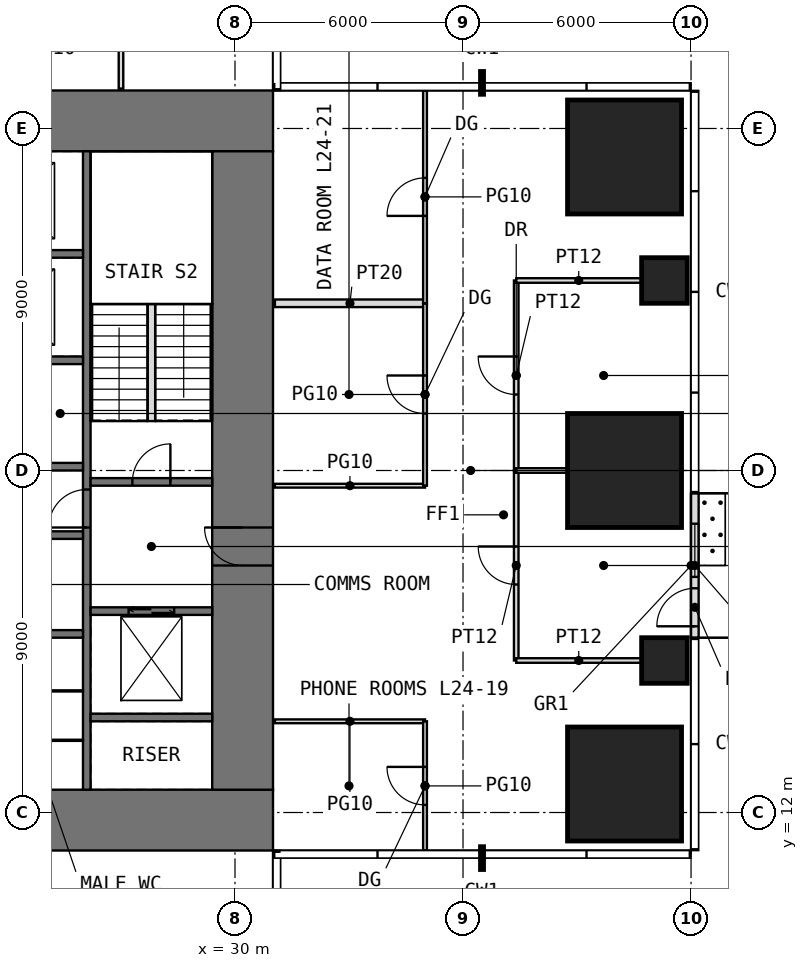
"""IFC4 building model, lengths in metres.
Left out: names, types, materials, properties, quantities, classifications, styles, units other than length and angle.
Written with IfcOpenShell. Run it as: python <this file> out.ifc"""

import sys

from ifc_helpers import new_model, si_unit, direction, frame, frame_2d, origin, origin_2d, place, context, subcontext, project, spatial, rectangle, extrude, element, fill, save


model = new_model("IFC4")
c1 = context("Model", 3, precision=1e-05, world=origin(), true_north=direction((0.0, 1.0)))
c2 = subcontext(c1, "Body", "Model", "MODEL_VIEW")
j1 = project(units=[si_unit("LENGTHUNIT", "METRE"), si_unit("PLANEANGLEUNIT", "RADIAN")], contexts=[c1])
p1 = place(None, origin())
s1 = spatial("IfcSite", under=j1, at=p1, CompositionType="ELEMENT")
p2 = place(p1, origin())
s2 = spatial("IfcBuilding", under=s1, at=p2, CompositionType="ELEMENT")
p3 = place(p2, frame((0.0, 0.0, 104.5)))
s3 = spatial("IfcBuildingStorey", under=s2, at=p3, CompositionType="ELEMENT", Elevation=104.5)
p4 = place(p3, frame((40.25, 12.75, 0.0), z_axis=(0.0, 0.0, 1.0), x_axis=(1.0, 0.0, 0.0)))
e1 = element("IfcColumn", 1, at=p4, inside=s3, PredefinedType="COLUMN", context=c2, shape_type="SweptSolid", body=[
    extrude(rectangle(XDim=3.0, YDim=3.0, at=origin_2d()), origin(), (0.0, 0.0, 1.0), 4.0),
])
p5 = place(p3, frame((41.3, 16.0, 0.0), z_axis=(0.0, 0.0, 1.0), x_axis=(1.0, 0.0, 0.0)))
e2 = element("IfcColumn", 2, at=p5, inside=s3, PredefinedType="COLUMN", context=c2, shape_type="SweptSolid", body=[
    extrude(rectangle(XDim=1.2, YDim=1.2, at=origin_2d()), origin(), (0.0, 0.0, 1.0), 4.0),
])
p6 = place(p3, frame((40.25, 21.0, 0.0), z_axis=(0.0, 0.0, 1.0), x_axis=(1.0, 0.0, 0.0)))
e3 = element("IfcColumn", 3, at=p6, inside=s3, PredefinedType="COLUMN", context=c2, shape_type="SweptSolid", body=[
    extrude(rectangle(XDim=3.0, YDim=3.0, at=origin_2d()), origin(), (0.0, 0.0, 1.0), 4.0),
])
p7 = place(p3, frame((41.3, 26.0, 0.0), z_axis=(0.0, 0.0, 1.0), x_axis=(1.0, 0.0, 0.0)))
e4 = element("IfcColumn", 4, at=p7, inside=s3, PredefinedType="COLUMN", context=c2, shape_type="SweptSolid", body=[
    extrude(rectangle(XDim=1.2, YDim=1.2, at=origin_2d()), origin(), (0.0, 0.0, 1.0), 4.0),
])
p8 = place(p3, frame((40.25, 29.25, 0.0), z_axis=(0.0, 0.0, 1.0), x_axis=(1.0, 0.0, 0.0)))
e5 = element("IfcColumn", 5, at=p8, inside=s3, PredefinedType="COLUMN", context=c2, shape_type="SweptSolid", body=[
    extrude(rectangle(XDim=3.0, YDim=3.0, at=origin_2d()), origin(), (0.0, 0.0, 1.0), 4.0),
])
p9 = place(p3, frame((42.1, 16.6, 0.0), z_axis=(0.0, 0.0, 1.0), x_axis=(0.0, 1.0, 0.0)))
e6 = element("IfcWall", 6, at=p9, inside=s3, PredefinedType="USERDEFINED", context=c2, shape_type="SweptSolid", body=[
    extrude(rectangle(XDim=3.8, YDim=0.2, at=frame_2d((1.9, 0.0))), origin(), (0.0, 0.0, 1.0), 3.75),
])
p10 = place(p9, frame((0.3, 0.0, 0.0)))
e7 = element("IfcOpeningElement", 7, at=p10, cuts=e6, PredefinedType="OPENING", context=c2, shape_type="SweptSolid", body=[
    extrude(rectangle(XDim=1.0, YDim=2.4, at=frame_2d((0.5, 1.2))), frame((0.0, 0.11, 0.0), z_axis=(0.0, -1.0, 0.0), x_axis=(1.0, 0.0, 0.0)), (0.0, 0.0, 1.0), 0.22),
])
p11 = place(p9, frame((1.6, 0.0, 0.3)))
e8 = element("IfcOpeningElement", 8, at=p11, cuts=e6, PredefinedType="OPENING", context=c2, shape_type="SweptSolid", body=[
    extrude(rectangle(XDim=1.4, YDim=2.7, at=frame_2d((0.7, 1.35))), frame((0.0, 0.11, 0.0), z_axis=(0.0, -1.0, 0.0), x_axis=(1.0, 0.0, 0.0)), (0.0, 0.0, 1.0), 0.22),
])
p12 = place(p3, frame((11.0, 11.8, -0.05), z_axis=(0.0, 0.0, 1.0), x_axis=(1.0, 0.0, 0.0)))
e9 = element("IfcWall", 9, at=p12, inside=s3, PredefinedType="SHEAR", context=c2, shape_type="SweptSolid", body=[
    extrude(rectangle(XDim=20.0, YDim=1.6, at=frame_2d((10.0, 0.0))), origin(), (0.0, 0.0, 1.0), 4.0),
])
p13 = place(p12, frame((9.0, 0.0, 0.05)))
e10 = element("IfcOpeningElement", 10, at=p13, cuts=e9, PredefinedType="OPENING", context=c2, shape_type="SweptSolid", body=[
    extrude(rectangle(XDim=2.0, YDim=2.2, at=frame_2d((1.0, 1.1))), frame((0.0, 0.81, 0.0), z_axis=(0.0, -1.0, 0.0), x_axis=(1.0, 0.0, 0.0)), (0.0, 0.0, 1.0), 1.62),
])
p14 = place(p3, frame((11.0, 30.2, -0.05), z_axis=(0.0, 0.0, 1.0), x_axis=(1.0, 0.0, 0.0)))
e11 = element("IfcWall", 11, at=p14, inside=s3, PredefinedType="SHEAR", context=c2, shape_type="SweptSolid", body=[
    extrude(rectangle(XDim=20.0, YDim=1.6, at=frame_2d((10.0, 0.0))), origin(), (0.0, 0.0, 1.0), 4.0),
])
p15 = place(p14, frame((9.0, 0.0, 0.05)))
e12 = element("IfcOpeningElement", 12, at=p15, cuts=e11, PredefinedType="OPENING", context=c2, shape_type="SweptSolid", body=[
    extrude(rectangle(XDim=2.0, YDim=2.2, at=frame_2d((1.0, 1.1))), frame((0.0, 0.81, 0.0), z_axis=(0.0, -1.0, 0.0), x_axis=(1.0, 0.0, 0.0)), (0.0, 0.0, 1.0), 1.62),
])
p16 = place(p3, frame((30.2, 12.6, -0.05), z_axis=(0.0, 0.0, 1.0), x_axis=(0.0, 1.0, 0.0)))
e13 = element("IfcWall", 13, at=p16, inside=s3, PredefinedType="SHEAR", context=c2, shape_type="SweptSolid", body=[
    extrude(rectangle(XDim=16.8, YDim=1.6, at=frame_2d((8.4, 0.0))), origin(), (0.0, 0.0, 1.0), 4.0),
])
p17 = place(p16, frame((5.9, 0.0, 0.05)))
e14 = element("IfcOpeningElement", 14, at=p17, cuts=e13, PredefinedType="OPENING", context=c2, shape_type="SweptSolid", body=[
    extrude(rectangle(XDim=1.0, YDim=2.2, at=frame_2d((0.5, 1.1))), frame((0.0, 0.81, 0.0), z_axis=(0.0, -1.0, 0.0), x_axis=(1.0, 0.0, 0.0)), (0.0, 0.0, 1.0), 1.62),
])
p18 = place(p3, frame((26.1, 12.6, -0.05), z_axis=(0.0, 0.0, 1.0), x_axis=(0.0, 1.0, 0.0)))
e15 = element("IfcWall", 15, at=p18, inside=s3, PredefinedType="SHEAR", context=c2, shape_type="SweptSolid", body=[
    extrude(rectangle(XDim=16.8, YDim=0.2, at=frame_2d((8.4, 0.0))), origin(), (0.0, 0.0, 1.0), 4.0),
])
p19 = place(p18, frame((6.9, 0.0, 0.05)))
e16 = element("IfcOpeningElement", 16, at=p19, cuts=e15, PredefinedType="OPENING", context=c2, shape_type="SweptSolid", body=[
    extrude(rectangle(XDim=1.0, YDim=2.2, at=frame_2d((0.5, 1.1))), frame((0.0, 0.11, 0.0), z_axis=(0.0, -1.0, 0.0), x_axis=(1.0, 0.0, 0.0)), (0.0, 0.0, 1.0), 0.22),
])
for number, where, z_axis, x_axis in (
    (17, (22.8, 16.7, -0.05), (0.0, 0.0, 1.0), (1.0, 0.0, 0.0)),
    (18, (22.8, 19.3, -0.05), (0.0, 0.0, 1.0), (1.0, 0.0, 0.0)),
    (19, (22.8, 21.1, -0.05), (0.0, 0.0, 1.0), (1.0, 0.0, 0.0)),
    (20, (22.8, 23.9, -0.05), (0.0, 0.0, 1.0), (1.0, 0.0, 0.0)),
    (21, (22.8, 26.7, -0.05), (0.0, 0.0, 1.0), (1.0, 0.0, 0.0)),
    (22, (26.2, 14.5, -0.05), (0.0, 0.0, 1.0), (1.0, 0.0, 0.0)),
):
    element("IfcWall", number, at=place(p3, frame(where, z_axis=z_axis, x_axis=x_axis)), inside=s3, PredefinedType="SHEAR", context=c2, shape_type="SweptSolid", body=[
        extrude(rectangle(XDim=3.2, YDim=0.2, at=frame_2d((1.6, 0.0))), origin(), (0.0, 0.0, 1.0), 4.0),
    ])
p20 = place(p3, frame((26.2, 17.3, -0.05), z_axis=(0.0, 0.0, 1.0), x_axis=(1.0, 0.0, 0.0)))
e23 = element("IfcWall", 23, at=p20, inside=s3, PredefinedType="SHEAR", context=c2, shape_type="SweptSolid", body=[
    extrude(rectangle(XDim=3.2, YDim=0.2, at=frame_2d((1.6, 0.0))), origin(), (0.0, 0.0, 1.0), 4.0),
])
p21 = place(p20, frame((1.0, 0.0, 0.05)))
e24 = element("IfcOpeningElement", 24, at=p21, cuts=e23, PredefinedType="OPENING", context=c2, shape_type="SweptSolid", body=[
    extrude(rectangle(XDim=1.2, YDim=2.2, at=frame_2d((0.6, 1.1))), frame((0.0, 0.11, 0.0), z_axis=(0.0, -1.0, 0.0), x_axis=(1.0, 0.0, 0.0)), (0.0, 0.0, 1.0), 0.22),
])
p22 = place(p3, frame((26.2, 20.7, -0.05), z_axis=(0.0, 0.0, 1.0), x_axis=(1.0, 0.0, 0.0)))
e25 = element("IfcWall", 25, at=p22, inside=s3, PredefinedType="SHEAR", context=c2, shape_type="SweptSolid", body=[
    extrude(rectangle(XDim=3.2, YDim=0.2, at=frame_2d((1.6, 0.0))), origin(), (0.0, 0.0, 1.0), 4.0),
])
p23 = place(p22, frame((1.1, 0.0, 0.05)))
e26 = element("IfcOpeningElement", 26, at=p23, cuts=e25, PredefinedType="OPENING", context=c2, shape_type="SweptSolid", body=[
    extrude(rectangle(XDim=1.0, YDim=2.2, at=frame_2d((0.5, 1.1))), frame((0.0, 0.11, 0.0), z_axis=(0.0, -1.0, 0.0), x_axis=(1.0, 0.0, 0.0)), (0.0, 0.0, 1.0), 0.22),
])
for number, where, z_axis, x_axis in (
    (27, (24.6, 13.9, 0.0), (0.0, 0.0, 1.0), (1.0, 0.0, 0.0)),
    (28, (24.6, 15.2, 0.0), (0.0, 0.0, 1.0), (1.0, 0.0, 0.0)),
):
    element("IfcWall", number, at=place(p3, frame(where, z_axis=z_axis, x_axis=x_axis)), inside=s3, PredefinedType="PARTITIONING", context=c2, shape_type="SweptSolid", body=[
        extrude(rectangle(XDim=1.4, YDim=0.03, at=frame_2d((0.7, 0.0))), origin(), (0.0, 0.0, 1.0), 3.75),
    ])
p24 = place(p3, frame((27.0, 31.05, 0.0), z_axis=(0.0, 0.0, 1.0), x_axis=(0.0, 1.0, 0.0)))
e29 = element("IfcWall", 29, at=p24, inside=s3, PredefinedType="PARTITIONING", context=c2, shape_type="SweptSolid", body=[
    extrude(rectangle(XDim=3.45, YDim=0.12, at=frame_2d((1.725, 0.0))), origin(), (0.0, 0.0, 1.0), 3.75),
])
for number, where, z_axis, x_axis in (
    (30, (31.05, 14.4, 0.0), (0.0, 0.0, 1.0), (1.0, 0.0, 0.0)),
    (31, (31.05, 20.6, 0.0), (0.0, 0.0, 1.0), (1.0, 0.0, 0.0)),
):
    element("IfcWall", number, at=place(p3, frame(where, z_axis=z_axis, x_axis=x_axis)), inside=s3, PredefinedType="PARTITIONING", context=c2, shape_type="SweptSolid", body=[
        extrude(rectangle(XDim=3.95, YDim=0.1, at=frame_2d((1.975, 0.0))), origin(), (0.0, 0.0, 1.0), 3.75),
    ])
p25 = place(p3, frame((31.05, 25.4, 0.0), z_axis=(0.0, 0.0, 1.0), x_axis=(1.0, 0.0, 0.0)))
e32 = element("IfcWall", 32, at=p25, inside=s3, PredefinedType="PARTITIONING", context=c2, shape_type="SweptSolid", body=[
    extrude(rectangle(XDim=3.95, YDim=0.2, at=frame_2d((1.975, 0.0))), origin(), (0.0, 0.0, 1.0), 3.75),
])
p26 = place(p3, frame((35.0, 11.0, 0.0), z_axis=(0.0, 0.0, 1.0), x_axis=(0.0, 1.0, 0.0)))
e33 = element("IfcWall", 33, at=p26, inside=s3, PredefinedType="PARTITIONING", context=c2, shape_type="SweptSolid", body=[
    extrude(rectangle(XDim=3.4, YDim=0.1, at=frame_2d((1.7, 0.0))), origin(), (0.0, 0.0, 1.0), 3.75),
])
p27 = place(p26, frame((1.2, 0.0, 0.0)))
e34 = element("IfcOpeningElement", 34, at=p27, cuts=e33, PredefinedType="OPENING", context=c2, shape_type="SweptSolid", body=[
    extrude(rectangle(XDim=1.0, YDim=2.4, at=frame_2d((0.5, 1.2))), frame((0.0, 0.06, 0.0), z_axis=(0.0, -1.0, 0.0), x_axis=(1.0, 0.0, 0.0)), (0.0, 0.0, 1.0), 0.12),
])
p28 = place(p3, frame((35.0, 20.6, 0.0), z_axis=(0.0, 0.0, 1.0), x_axis=(0.0, 1.0, 0.0)))
e35 = element("IfcWall", 35, at=p28, inside=s3, PredefinedType="PARTITIONING", context=c2, shape_type="SweptSolid", body=[
    extrude(rectangle(XDim=4.8, YDim=0.1, at=frame_2d((2.4, 0.0))), origin(), (0.0, 0.0, 1.0), 3.75),
])
p29 = place(p28, frame((1.9, 0.0, 0.0)))
e36 = element("IfcOpeningElement", 36, at=p29, cuts=e35, PredefinedType="OPENING", context=c2, shape_type="SweptSolid", body=[
    extrude(rectangle(XDim=1.0, YDim=2.4, at=frame_2d((0.5, 1.2))), frame((0.0, 0.06, 0.0), z_axis=(0.0, -1.0, 0.0), x_axis=(1.0, 0.0, 0.0)), (0.0, 0.0, 1.0), 0.12),
])
p30 = place(p3, frame((35.0, 25.4, 0.0), z_axis=(0.0, 0.0, 1.0), x_axis=(0.0, 1.0, 0.0)))
e37 = element("IfcWall", 37, at=p30, inside=s3, PredefinedType="PARTITIONING", context=c2, shape_type="SweptSolid", body=[
    extrude(rectangle(XDim=5.6, YDim=0.1, at=frame_2d((2.8, 0.0))), origin(), (0.0, 0.0, 1.0), 3.75),
])
p31 = place(p30, frame((2.3, 0.0, 0.0)))
e38 = element("IfcOpeningElement", 38, at=p31, cuts=e37, PredefinedType="OPENING", context=c2, shape_type="SweptSolid", body=[
    extrude(rectangle(XDim=1.0, YDim=2.4, at=frame_2d((0.5, 1.2))), frame((0.0, 0.06, 0.0), z_axis=(0.0, -1.0, 0.0), x_axis=(1.0, 0.0, 0.0)), (0.0, 0.0, 1.0), 0.12),
])
p32 = place(p3, frame((37.4, 16.0, 0.0), z_axis=(0.0, 0.0, 1.0), x_axis=(0.0, 1.0, 0.0)))
e39 = element("IfcWall", 39, at=p32, inside=s3, PredefinedType="PARTITIONING", context=c2, shape_type="SweptSolid", body=[
    extrude(rectangle(XDim=5.0, YDim=0.12, at=frame_2d((2.5, 0.0))), origin(), (0.0, 0.0, 1.0), 3.75),
])
p33 = place(p32, frame((2.0, 0.0, 0.0)))
e40 = element("IfcOpeningElement", 40, at=p33, cuts=e39, PredefinedType="OPENING", context=c2, shape_type="SweptSolid", body=[
    extrude(rectangle(XDim=1.0, YDim=2.2, at=frame_2d((0.5, 1.1))), frame((0.0, 0.07, 0.0), z_axis=(0.0, -1.0, 0.0), x_axis=(1.0, 0.0, 0.0)), (0.0, 0.0, 1.0), 0.14),
])
p34 = place(p3, frame((37.4, 16.0, 0.0), z_axis=(0.0, 0.0, 1.0), x_axis=(1.0, 0.0, 0.0)))
e41 = element("IfcWall", 41, at=p34, inside=s3, PredefinedType="PARTITIONING", context=c2, shape_type="SweptSolid", body=[
    extrude(rectangle(XDim=3.29, YDim=0.12, at=frame_2d((1.645, 0.0))), origin(), (0.0, 0.0, 1.0), 3.75),
])
p35 = place(p3, frame((37.4, 21.0, 0.0), z_axis=(0.0, 0.0, 1.0), x_axis=(0.0, 1.0, 0.0)))
e42 = element("IfcWall", 42, at=p35, inside=s3, PredefinedType="PARTITIONING", context=c2, shape_type="SweptSolid", body=[
    extrude(rectangle(XDim=5.0, YDim=0.12, at=frame_2d((2.5, 0.0))), origin(), (0.0, 0.0, 1.0), 3.75),
])
p36 = place(p35, frame((2.0, 0.0, 0.0)))
e43 = element("IfcOpeningElement", 43, at=p36, cuts=e42, PredefinedType="OPENING", context=c2, shape_type="SweptSolid", body=[
    extrude(rectangle(XDim=1.0, YDim=2.2, at=frame_2d((0.5, 1.1))), frame((0.0, 0.07, 0.0), z_axis=(0.0, -1.0, 0.0), x_axis=(1.0, 0.0, 0.0)), (0.0, 0.0, 1.0), 0.14),
])
p37 = place(p3, frame((37.4, 21.0, 0.0), z_axis=(0.0, 0.0, 1.0), x_axis=(1.0, 0.0, 0.0)))
e44 = element("IfcWall", 44, at=p37, inside=s3, PredefinedType="PARTITIONING", context=c2, shape_type="SweptSolid", body=[
    extrude(rectangle(XDim=1.34, YDim=0.12, at=frame_2d((0.67, 0.0))), origin(), (0.0, 0.0, 1.0), 3.75),
])
p38 = place(p3, frame((37.4, 26.0, 0.0), z_axis=(0.0, 0.0, 1.0), x_axis=(1.0, 0.0, 0.0)))
e45 = element("IfcWall", 45, at=p38, inside=s3, PredefinedType="PARTITIONING", context=c2, shape_type="SweptSolid", body=[
    extrude(rectangle(XDim=3.29, YDim=0.12, at=frame_2d((1.645, 0.0))), origin(), (0.0, 0.0, 1.0), 3.75),
])
p39 = place(p3, frame((27.8, 22.3, 0.0), z_axis=(0.0, 0.0, 1.0), x_axis=(0.0, 1.0, 0.0)))
e46 = element("IfcWall", 46, at=p39, inside=s3, PredefinedType="PARTITIONING", context=c2, shape_type="SweptSolid", body=[
    extrude(rectangle(XDim=3.08, YDim=0.2, at=frame_2d((1.54, 0.0))), origin(), (0.0, 0.0, 1.0), 4.0),
])
p40 = place(p10, origin())
e47 = element("IfcDoor", 47, at=p40, inside=s3, OperationType="SINGLE_SWING_LEFT", PredefinedType="DOOR", context=c2, shape_type="SweptSolid", body=[
    extrude(rectangle(XDim=1.0, YDim=2.4, at=frame_2d((0.5, 1.2))), frame((0.0, 0.025, 0.0), z_axis=(0.0, -1.0, 0.0), x_axis=(1.0, 0.0, 0.0)), (0.0, 0.0, 1.0), 0.05),
])
fill(e7, e47)
p41 = place(p11, origin())
e48 = element("IfcWindow", 48, at=p41, inside=s3, PartitioningType="SINGLE_PANEL", PredefinedType="WINDOW", context=c2, shape_type="SweptSolid", body=[
    extrude(rectangle(XDim=1.4, YDim=2.7, at=frame_2d((0.7, 1.35))), frame((0.0, 0.03, 0.0), z_axis=(0.0, -1.0, 0.0), x_axis=(1.0, 0.0, 0.0)), (0.0, 0.0, 1.0), 0.06),
])
fill(e8, e48)
p42 = place(p17, origin())
e49 = element("IfcDoor", 49, at=p42, inside=s3, OperationType="SINGLE_SWING_RIGHT", PredefinedType="DOOR", context=c2, shape_type="SweptSolid", body=[
    extrude(rectangle(XDim=1.0, YDim=2.2, at=frame_2d((0.5, 1.1))), frame((0.0, 0.025, 0.0), z_axis=(0.0, -1.0, 0.0), x_axis=(1.0, 0.0, 0.0)), (0.0, 0.0, 1.0), 0.05),
])
fill(e14, e49)
p43 = place(p23, origin())
e50 = element("IfcDoor", 50, at=p43, inside=s3, OperationType="SINGLE_SWING_RIGHT", PredefinedType="DOOR", context=c2, shape_type="SweptSolid", body=[
    extrude(rectangle(XDim=1.0, YDim=2.2, at=frame_2d((0.5, 1.1))), frame((0.0, 0.025, 0.0), z_axis=(0.0, -1.0, 0.0), x_axis=(1.0, 0.0, 0.0)), (0.0, 0.0, 1.0), 0.05),
])
fill(e26, e50)
p44 = place(p19, origin())
e51 = element("IfcDoor", 51, at=p44, inside=s3, OperationType="SINGLE_SWING_LEFT", PredefinedType="DOOR", context=c2, shape_type="SweptSolid", body=[
    extrude(rectangle(XDim=1.0, YDim=2.2, at=frame_2d((0.5, 1.1))), frame((0.0, 0.025, 0.0), z_axis=(0.0, -1.0, 0.0), x_axis=(1.0, 0.0, 0.0)), (0.0, 0.0, 1.0), 0.05),
])
fill(e16, e51)
p45 = place(p27, origin())
e52 = element("IfcDoor", 52, at=p45, inside=s3, OperationType="SINGLE_SWING_RIGHT", PredefinedType="DOOR", context=c2, shape_type="SweptSolid", body=[
    extrude(rectangle(XDim=1.0, YDim=2.4, at=frame_2d((0.5, 1.2))), frame((0.0, 0.025, 0.0), z_axis=(0.0, -1.0, 0.0), x_axis=(1.0, 0.0, 0.0)), (0.0, 0.0, 1.0), 0.05),
])
fill(e34, e52)
p46 = place(p29, origin())
e53 = element("IfcDoor", 53, at=p46, inside=s3, OperationType="SINGLE_SWING_RIGHT", PredefinedType="DOOR", context=c2, shape_type="SweptSolid", body=[
    extrude(rectangle(XDim=1.0, YDim=2.4, at=frame_2d((0.5, 1.2))), frame((0.0, 0.025, 0.0), z_axis=(0.0, -1.0, 0.0), x_axis=(1.0, 0.0, 0.0)), (0.0, 0.0, 1.0), 0.05),
])
fill(e36, e53)
p47 = place(p31, origin())
e54 = element("IfcDoor", 54, at=p47, inside=s3, OperationType="SINGLE_SWING_LEFT", PredefinedType="DOOR", context=c2, shape_type="SweptSolid", body=[
    extrude(rectangle(XDim=1.0, YDim=2.4, at=frame_2d((0.5, 1.2))), frame((0.0, 0.025, 0.0), z_axis=(0.0, -1.0, 0.0), x_axis=(1.0, 0.0, 0.0)), (0.0, 0.0, 1.0), 0.05),
])
fill(e38, e54)
p48 = place(p33, origin())
e55 = element("IfcDoor", 55, at=p48, inside=s3, OperationType="SINGLE_SWING_RIGHT", PredefinedType="DOOR", context=c2, shape_type="SweptSolid", body=[
    extrude(rectangle(XDim=1.0, YDim=2.2, at=frame_2d((0.5, 1.1))), frame((0.0, 0.025, 0.0), z_axis=(0.0, -1.0, 0.0), x_axis=(1.0, 0.0, 0.0)), (0.0, 0.0, 1.0), 0.05),
])
fill(e40, e55)
p49 = place(p36, origin())
e56 = element("IfcDoor", 56, at=p49, inside=s3, OperationType="SINGLE_SWING_RIGHT", PredefinedType="DOOR", context=c2, shape_type="SweptSolid", body=[
    extrude(rectangle(XDim=1.0, YDim=2.2, at=frame_2d((0.5, 1.1))), frame((0.0, 0.025, 0.0), z_axis=(0.0, -1.0, 0.0), x_axis=(1.0, 0.0, 0.0)), (0.0, 0.0, 1.0), 0.05),
])
fill(e43, e56)
p50 = place(p21, origin())
e57 = element("IfcDoor", 57, at=p50, inside=s3, OperationType="DOUBLE_DOOR_SLIDING", PredefinedType="DOOR", context=c2, shape_type="SweptSolid", body=[
    extrude(rectangle(XDim=1.2, YDim=2.2, at=frame_2d((0.6, 1.1))), frame((0.0, 0.025, 0.0), z_axis=(0.0, -1.0, 0.0), x_axis=(1.0, 0.0, 0.0)), (0.0, 0.0, 1.0), 0.05),
])
fill(e24, e57)
save(model, sys.argv[1])
